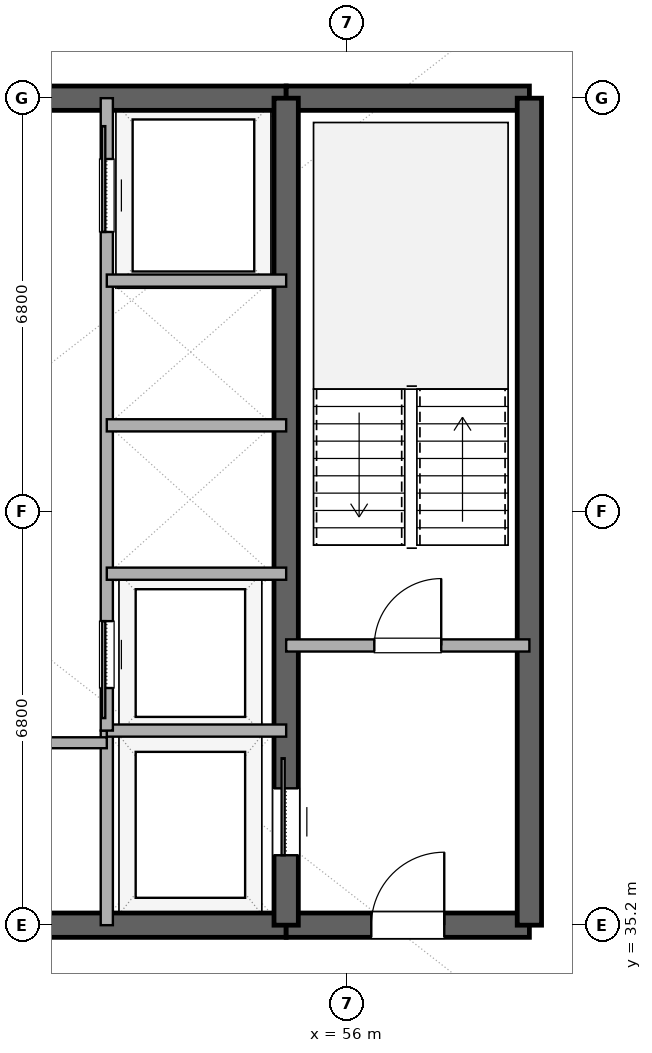
"""IFC4 building model, lengths in metres.
Left out: names, types, materials, properties, quantities, classifications, styles, units other than length and angle.
Written with IfcOpenShell. Run it as: python <this file> out.ifc"""

import sys

from ifc_helpers import new_model, si_unit, direction, frame, frame_2d, origin, place, context, subcontext, project, spatial, rectangle, extrude, element, fill, save


model = new_model("IFC4")
c1 = context("Model", 3, precision=1e-05, world=origin(), true_north=direction((0.0, 1.0)))
c2 = subcontext(c1, "Body", "Model", "MODEL_VIEW")
j1 = project(units=[si_unit("LENGTHUNIT", "METRE"), si_unit("PLANEANGLEUNIT", "RADIAN")], contexts=[c1])
p1 = place(None, origin())
s1 = spatial("IfcSite", under=j1, at=p1, CompositionType="ELEMENT")
p2 = place(p1, origin())
s2 = spatial("IfcBuilding", under=s1, at=p2, CompositionType="ELEMENT")
p3 = place(p2, frame((0.0, 0.0, 217.2)))
s3 = spatial("IfcBuildingStorey", under=s2, at=p3, CompositionType="ELEMENT", Elevation=217.2)
p4 = place(p3, frame((41.0, 35.2, 0.0), z_axis=(0.0, 0.0, 1.0), x_axis=(1.0, 0.0, 0.0)))
e1 = element("IfcWall", 1, at=p4, inside=s3, PredefinedType="SHEAR", context=c2, shape_type="SweptSolid", body=[
    extrude(rectangle(XDim=14.0, YDim=0.4, at=frame_2d((7.0, 0.0))), origin(), (0.0, 0.0, 1.0), 3.36),
])
p5 = place(p4, frame((6.1, 0.0, 0.0)))
e2 = element("IfcOpeningElement", 2, at=p5, cuts=e1, PredefinedType="OPENING", context=c2, shape_type="SweptSolid", body=[
    extrude(rectangle(XDim=1.8, YDim=2.25, at=frame_2d((0.9, 1.125))), frame((0.0, 0.21, 0.0), z_axis=(0.0, -1.0, 0.0), x_axis=(1.0, 0.0, 0.0)), (0.0, 0.0, 1.0), 0.42),
])
p6 = place(p3, frame((55.0, 35.2, 0.0), z_axis=(0.0, 0.0, 1.0), x_axis=(1.0, 0.0, 0.0)))
e3 = element("IfcWall", 3, at=p6, inside=s3, PredefinedType="SHEAR", context=c2, shape_type="SweptSolid", body=[
    extrude(rectangle(XDim=4.0, YDim=0.4, at=frame_2d((2.0, 0.0))), origin(), (0.0, 0.0, 1.0), 3.36),
])
p7 = place(p6, frame((1.4, 0.0, 0.0)))
e4 = element("IfcOpeningElement", 4, at=p7, cuts=e3, PredefinedType="OPENING", context=c2, shape_type="SweptSolid", body=[
    extrude(rectangle(XDim=1.2, YDim=2.15, at=frame_2d((0.6, 1.075))), frame((0.0, 0.21, 0.0), z_axis=(0.0, -1.0, 0.0), x_axis=(1.0, 0.0, 0.0)), (0.0, 0.0, 1.0), 0.42),
])
p8 = place(p3, frame((41.0, 48.8, 0.0), z_axis=(0.0, 0.0, 1.0), x_axis=(1.0, 0.0, 0.0)))
e5 = element("IfcWall", 5, at=p8, inside=s3, PredefinedType="SHEAR", context=c2, shape_type="SweptSolid", body=[
    extrude(rectangle(XDim=14.0, YDim=0.4, at=frame_2d((7.0, 0.0))), origin(), (0.0, 0.0, 1.0), 3.36),
])
p9 = place(p8, frame((6.1, 0.0, 0.0)))
e6 = element("IfcOpeningElement", 6, at=p9, cuts=e5, PredefinedType="OPENING", context=c2, shape_type="SweptSolid", body=[
    extrude(rectangle(XDim=1.8, YDim=2.25, at=frame_2d((0.9, 1.125))), frame((0.0, 0.21, 0.0), z_axis=(0.0, -1.0, 0.0), x_axis=(1.0, 0.0, 0.0)), (0.0, 0.0, 1.0), 0.42),
])
p10 = place(p3, frame((55.0, 48.8, 0.0), z_axis=(0.0, 0.0, 1.0), x_axis=(1.0, 0.0, 0.0)))
e7 = element("IfcWall", 7, at=p10, inside=s3, PredefinedType="SHEAR", context=c2, shape_type="SweptSolid", body=[
    extrude(rectangle(XDim=4.0, YDim=0.4, at=frame_2d((2.0, 0.0))), origin(), (0.0, 0.0, 1.0), 3.36),
])
p11 = place(p3, frame((59.0, 35.2, 0.0), z_axis=(0.0, 0.0, 1.0), x_axis=(0.0, 1.0, 0.0)))
e8 = element("IfcWall", 8, at=p11, inside=s3, PredefinedType="SHEAR", context=c2, shape_type="SweptSolid", body=[
    extrude(rectangle(XDim=13.6, YDim=0.4, at=frame_2d((6.8, 0.0))), origin(), (0.0, 0.0, 1.0), 3.36),
])
p12 = place(p3, frame((55.0, 35.2, 0.0), z_axis=(0.0, 0.0, 1.0), x_axis=(0.0, 1.0, 0.0)))
e9 = element("IfcWall", 9, at=p12, inside=s3, PredefinedType="SHEAR", context=c2, shape_type="SweptSolid", body=[
    extrude(rectangle(XDim=13.6, YDim=0.4, at=frame_2d((6.8, 0.0))), origin(), (0.0, 0.0, 1.0), 3.36),
])
p13 = place(p12, frame((1.15, 0.0, 0.0)))
e10 = element("IfcOpeningElement", 10, at=p13, cuts=e9, PredefinedType="OPENING", context=c2, shape_type="SweptSolid", body=[
    extrude(rectangle(XDim=1.1, YDim=2.2, at=frame_2d((0.55, 1.1))), frame((0.0, 0.21, 0.0), z_axis=(0.0, -1.0, 0.0), x_axis=(1.0, 0.0, 0.0)), (0.0, 0.0, 1.0), 0.42),
])
p14 = place(p3, frame((55.0, 39.8, 0.0), z_axis=(0.0, 0.0, 1.0), x_axis=(1.0, 0.0, 0.0)))
e11 = element("IfcWall", 11, at=p14, inside=s3, PredefinedType="SOLIDWALL", context=c2, shape_type="SweptSolid", body=[
    extrude(rectangle(XDim=4.0, YDim=0.2, at=frame_2d((2.0, 0.0))), origin(), (0.0, 0.0, 1.0), 2.72),
])
p15 = place(p14, frame((1.45, 0.0, 0.0)))
e12 = element("IfcOpeningElement", 12, at=p15, cuts=e11, PredefinedType="OPENING", context=c2, shape_type="SweptSolid", body=[
    extrude(rectangle(XDim=1.1, YDim=2.15, at=frame_2d((0.55, 1.075))), frame((0.0, 0.11, 0.0), z_axis=(0.0, -1.0, 0.0), x_axis=(1.0, 0.0, 0.0)), (0.0, 0.0, 1.0), 0.22),
])
p16 = place(p3, frame((52.05, 35.2, 0.0), z_axis=(0.0, 0.0, 1.0), x_axis=(0.0, 1.0, 0.0)))
e13 = element("IfcWall", 13, at=p16, inside=s3, PredefinedType="SOLIDWALL", context=c2, shape_type="SweptSolid", body=[
    extrude(rectangle(XDim=3.2, YDim=0.2, at=frame_2d((1.6, 0.0))), origin(), (0.0, 0.0, 1.0), 2.72),
])
p17 = place(p3, frame((52.05, 38.4, 0.0), z_axis=(0.0, 0.0, 1.0), x_axis=(1.0, 0.0, 0.0)))
e14 = element("IfcWall", 14, at=p17, inside=s3, PredefinedType="SOLIDWALL", context=c2, shape_type="SweptSolid", body=[
    extrude(rectangle(XDim=2.95, YDim=0.2, at=frame_2d((1.475, 0.0))), origin(), (0.0, 0.0, 1.0), 2.72),
])
p18 = place(p3, frame((52.05, 38.4, 0.0), z_axis=(0.0, 0.0, 1.0), x_axis=(0.0, 1.0, 0.0)))
e15 = element("IfcWall", 15, at=p18, inside=s3, PredefinedType="SOLIDWALL", context=c2, shape_type="SweptSolid", body=[
    extrude(rectangle(XDim=10.4, YDim=0.2, at=frame_2d((5.2, 0.0))), origin(), (0.0, 0.0, 1.0), 2.72),
])
p19 = place(p18, frame((0.7, 0.0, 0.0)))
e16 = element("IfcOpeningElement", 16, at=p19, cuts=e15, PredefinedType="OPENING", context=c2, shape_type="SweptSolid", body=[
    extrude(rectangle(XDim=1.1, YDim=2.2, at=frame_2d((0.55, 1.1))), frame((0.0, 0.11, 0.0), z_axis=(0.0, -1.0, 0.0), x_axis=(1.0, 0.0, 0.0)), (0.0, 0.0, 1.0), 0.22),
])
p20 = place(p18, frame((8.2, 0.0, 0.0)))
e17 = element("IfcOpeningElement", 17, at=p20, cuts=e15, PredefinedType="OPENING", context=c2, shape_type="SweptSolid", body=[
    extrude(rectangle(XDim=1.2, YDim=2.2, at=frame_2d((0.6, 1.1))), frame((0.0, 0.11, 0.0), z_axis=(0.0, -1.0, 0.0), x_axis=(1.0, 0.0, 0.0)), (0.0, 0.0, 1.0), 0.22),
])
for number, where, z_axis, x_axis in (
    (18, (52.05, 40.98, 0.0), (0.0, 0.0, 1.0), (1.0, 0.0, 0.0)),
    (19, (52.05, 43.42, 0.0), (0.0, 0.0, 1.0), (1.0, 0.0, 0.0)),
    (20, (52.05, 45.8, 0.0), (0.0, 0.0, 1.0), (1.0, 0.0, 0.0)),
):
    element("IfcWall", number, at=place(p3, frame(where, z_axis=z_axis, x_axis=x_axis)), inside=s3, PredefinedType="SOLIDWALL", context=c2, shape_type="SweptSolid", body=[
        extrude(rectangle(XDim=2.95, YDim=0.2, at=frame_2d((1.475, 0.0))), origin(), (0.0, 0.0, 1.0), 2.72),
    ])
p21 = place(p3, frame((49.9, 38.2, 0.0), z_axis=(0.0, 0.0, 1.0), x_axis=(1.0, 0.0, 0.0)))
e21 = element("IfcWall", 21, at=p21, inside=s3, PredefinedType="PLUMBINGWALL", context=c2, shape_type="SweptSolid", body=[
    extrude(rectangle(XDim=2.15, YDim=0.18, at=frame_2d((1.075, 0.0))), origin(), (0.0, 0.0, 1.0), 2.72),
])
p22 = place(p13, origin())
e22 = element("IfcDoor", 22, at=p22, inside=s3, OperationType="SLIDING_TO_RIGHT", PredefinedType="DOOR", context=c2, shape_type="SweptSolid", body=[
    extrude(rectangle(XDim=1.1, YDim=2.2, at=frame_2d((0.55, 1.1))), frame((0.0, 0.025, 0.0), z_axis=(0.0, -1.0, 0.0), x_axis=(1.0, 0.0, 0.0)), (0.0, 0.0, 1.0), 0.05),
])
fill(e10, e22)
p23 = place(p7, origin())
e23 = element("IfcDoor", 23, at=p23, inside=s3, OperationType="SINGLE_SWING_RIGHT", PredefinedType="DOOR", context=c2, shape_type="SweptSolid", body=[
    extrude(rectangle(XDim=1.2, YDim=2.15, at=frame_2d((0.6, 1.075))), frame((0.0, 0.025, 0.0), z_axis=(0.0, -1.0, 0.0), x_axis=(1.0, 0.0, 0.0)), (0.0, 0.0, 1.0), 0.05),
])
fill(e4, e23)
p24 = place(p15, origin())
e24 = element("IfcDoor", 24, at=p24, inside=s3, OperationType="SINGLE_SWING_RIGHT", PredefinedType="DOOR", context=c2, shape_type="SweptSolid", body=[
    extrude(rectangle(XDim=1.1, YDim=2.15, at=frame_2d((0.55, 1.075))), frame((0.0, 0.025, 0.0), z_axis=(0.0, -1.0, 0.0), x_axis=(1.0, 0.0, 0.0)), (0.0, 0.0, 1.0), 0.05),
])
fill(e12, e24)
p25 = place(p19, origin())
e25 = element("IfcDoor", 25, at=p25, inside=s3, OperationType="SLIDING_TO_LEFT", PredefinedType="DOOR", context=c2, shape_type="SweptSolid", body=[
    extrude(rectangle(XDim=1.1, YDim=2.2, at=frame_2d((0.55, 1.1))), frame((0.0, 0.025, 0.0), z_axis=(0.0, -1.0, 0.0), x_axis=(1.0, 0.0, 0.0)), (0.0, 0.0, 1.0), 0.05),
])
fill(e16, e25)
p26 = place(p20, origin())
e26 = element("IfcDoor", 26, at=p26, inside=s3, OperationType="SLIDING_TO_RIGHT", PredefinedType="DOOR", context=c2, shape_type="SweptSolid", body=[
    extrude(rectangle(XDim=1.2, YDim=2.2, at=frame_2d((0.6, 1.1))), frame((0.0, 0.025, 0.0), z_axis=(0.0, -1.0, 0.0), x_axis=(1.0, 0.0, 0.0)), (0.0, 0.0, 1.0), 0.05),
])
fill(e17, e26)
save(model, sys.argv[1])
